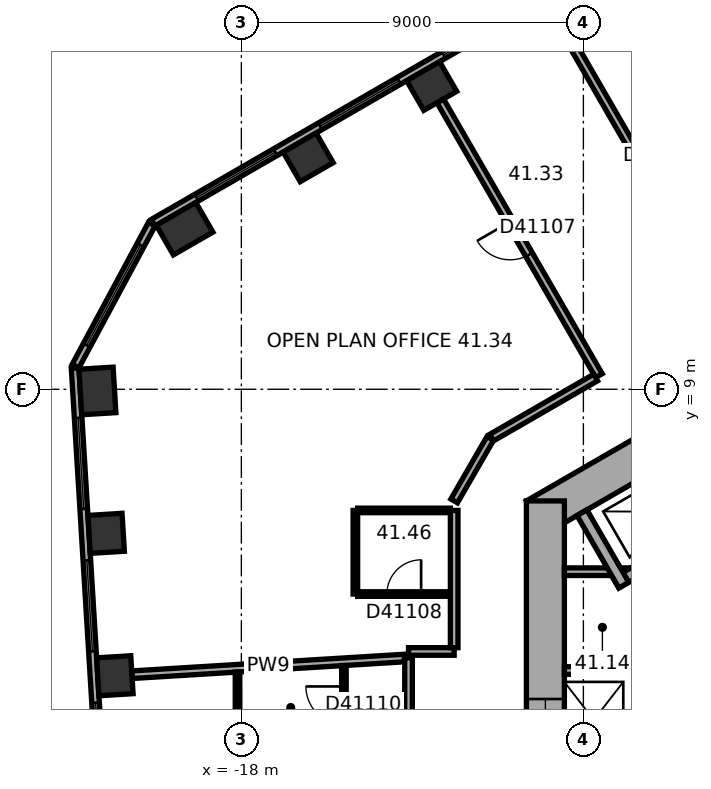
"""IFC4 building model, lengths in metres.
Left out: names, types, materials, properties, quantities, classifications, styles, units other than length and angle.
Written with IfcOpenShell. Run it as: python <this file> out.ifc"""

import sys

from ifc_helpers import new_model, si_unit, direction, frame, frame_2d, origin, origin_2d, place, context, subcontext, project, spatial, rectangle, extrude, element, fill, save


model = new_model("IFC4")
c1 = context("Model", 3, precision=1e-05, world=origin(), true_north=direction((0.0, 1.0)))
c2 = subcontext(c1, "Body", "Model", "MODEL_VIEW")
j1 = project(units=[si_unit("LENGTHUNIT", "METRE"), si_unit("PLANEANGLEUNIT", "RADIAN")], contexts=[c1])
p1 = place(None, origin())
s1 = spatial("IfcSite", under=j1, at=p1, CompositionType="ELEMENT")
p2 = place(p1, origin())
s2 = spatial("IfcBuilding", under=s1, at=p2, CompositionType="ELEMENT")
p3 = place(p2, frame((0.0, 0.0, 168.8)))
s3 = spatial("IfcBuildingStorey", under=s2, at=p3, CompositionType="ELEMENT", Elevation=168.8)
for number, where, z_axis, x_axis in (
    (1, (-12.991, 16.979, 0.0), (0.0, 0.0, 1.0), (-0.866, -0.5, 0.0)),
    (2, (-16.242, 15.102, 0.0), (0.0, 0.0, 1.0), (-0.866, -0.5, 0.0)),
):
    element("IfcColumn", number, at=place(p3, frame(where, z_axis=z_axis, x_axis=x_axis)), inside=s3, PredefinedType="COLUMN", context=c2, shape_type="SweptSolid", body=[
        extrude(rectangle(XDim=1.0, YDim=0.9, at=origin_2d()), origin(), (0.0, 0.0, 1.0), 3.7),
    ])
for number, where, z_axis, x_axis in (
    (3, (-19.494, 13.225, 0.0), (0.0, 0.0, 1.0), (-0.866, -0.5, 0.0)),
    (4, (-21.787, 8.956, 0.0), (0.0, 0.0, 1.0), (0.061, -0.998, 0.0)),
):
    element("IfcColumn", number, at=place(p3, frame(where, z_axis=z_axis, x_axis=x_axis)), inside=s3, PredefinedType="COLUMN", context=c2, shape_type="SweptSolid", body=[
        extrude(rectangle(XDim=1.2, YDim=0.9, at=origin_2d()), origin(), (0.0, 0.0, 1.0), 3.7),
    ])
for number, where, z_axis, x_axis in (
    (5, (-21.558, 5.209, 0.0), (0.0, 0.0, 1.0), (0.061, -0.998, 0.0)),
    (6, (-21.329, 1.462, 0.0), (0.0, 0.0, 1.0), (0.061, -0.998, 0.0)),
):
    element("IfcColumn", number, at=place(p3, frame(where, z_axis=z_axis, x_axis=x_axis)), inside=s3, PredefinedType="COLUMN", context=c2, shape_type="SweptSolid", body=[
        extrude(rectangle(XDim=1.0, YDim=0.9, at=origin_2d()), origin(), (0.0, 0.0, 1.0), 3.7),
    ])
p4 = place(p3, frame((0.25, 11.691, 0.0), z_axis=(0.0, 0.0, 1.0), x_axis=(-0.866022616891, -0.50000482701, 0.0)))
e7 = element("IfcWall", 7, at=p4, inside=s3, PredefinedType="SHEAR", context=c2, shape_type="SweptSolid", body=[
    extrude(rectangle(XDim=12.125, YDim=1.0, at=frame_2d((6.062, 0.0))), origin(), (0.0, 0.0, 1.0), 3.7),
])
p5 = place(p4, frame((6.262, 0.0, 0.0)))
e8 = element("IfcOpeningElement", 8, at=p5, cuts=e7, PredefinedType="OPENING", context=c2, shape_type="SweptSolid", body=[
    extrude(rectangle(XDim=1.5, YDim=2.1, at=frame_2d((0.75, 1.05))), frame((0.0, 0.51, 0.0), z_axis=(0.0, -1.0, 0.0), x_axis=(1.0, 0.0, 0.0)), (0.0, 0.0, 1.0), 1.02),
])
p6 = place(p4, frame((3.112, 0.0, 0.0)))
e9 = element("IfcOpeningElement", 9, at=p6, cuts=e7, PredefinedType="OPENING", context=c2, shape_type="SweptSolid", body=[
    extrude(rectangle(XDim=0.9, YDim=2.1, at=frame_2d((0.45, 1.05))), frame((0.0, 0.51, 0.0), z_axis=(0.0, -1.0, 0.0), x_axis=(1.0, 0.0, 0.0)), (0.0, 0.0, 1.0), 1.02),
])
p7 = place(p3, frame((-10.0, 6.062, 0.0), z_axis=(0.0, 0.0, 1.0), x_axis=(0.0, -1.0, 0.0)))
e10 = element("IfcWall", 10, at=p7, inside=s3, PredefinedType="SHEAR", context=c2, shape_type="SweptSolid", body=[
    extrude(rectangle(XDim=12.125, YDim=1.0, at=frame_2d((6.062, 0.0))), origin(), (0.0, 0.0, 1.0), 3.7),
])
p8 = place(p7, frame((5.212, 0.0, 0.0)))
e11 = element("IfcOpeningElement", 11, at=p8, cuts=e10, PredefinedType="OPENING", context=c2, shape_type="SweptSolid", body=[
    extrude(rectangle(XDim=1.1, YDim=2.1, at=frame_2d((0.55, 1.05))), frame((0.0, 0.51, 0.0), z_axis=(0.0, -1.0, 0.0), x_axis=(1.0, 0.0, 0.0)), (0.0, 0.0, 1.0), 1.02),
])
p9 = place(p7, frame((7.812, 0.0, 0.0)))
e12 = element("IfcOpeningElement", 12, at=p9, cuts=e10, PredefinedType="OPENING", context=c2, shape_type="SweptSolid", body=[
    extrude(rectangle(XDim=1.1, YDim=2.1, at=frame_2d((0.55, 1.05))), frame((0.0, 0.51, 0.0), z_axis=(0.0, -1.0, 0.0), x_axis=(1.0, 0.0, 0.0)), (0.0, 0.0, 1.0), 1.02),
])
p10 = place(p3, frame((-2.961, 23.405, 0.0), z_axis=(0.0, 0.0, 1.0), x_axis=(-0.866023315909, -0.500003616288, 0.0)))
e13 = element("IfcWall", 13, at=p10, inside=s3, PredefinedType="STANDARD", context=c2, shape_type="SweptSolid", body=[
    extrude(rectangle(XDim=20.044, YDim=0.2, at=frame_2d((10.022, 0.0))), origin(), (0.0, 0.0, 1.0), 3.7),
])
p11 = place(p10, frame((1.314, 0.0, 0.9)))
e14 = element("IfcOpeningElement", 14, at=p11, cuts=e13, PredefinedType="OPENING", context=c2, shape_type="SweptSolid", body=[
    extrude(rectangle(XDim=2.4, YDim=2.0, at=frame_2d((1.2, 1.0))), frame((0.0, 0.11, 0.0), z_axis=(0.0, -1.0, 0.0), x_axis=(1.0, 0.0, 0.0)), (0.0, 0.0, 1.0), 0.22),
])
p12 = place(p10, frame((5.069, 0.0, 0.9)))
e15 = element("IfcOpeningElement", 15, at=p12, cuts=e13, PredefinedType="OPENING", context=c2, shape_type="SweptSolid", body=[
    extrude(rectangle(XDim=2.4, YDim=2.0, at=frame_2d((1.2, 1.0))), frame((0.0, 0.11, 0.0), z_axis=(0.0, -1.0, 0.0), x_axis=(1.0, 0.0, 0.0)), (0.0, 0.0, 1.0), 0.22),
])
p13 = place(p10, frame((8.823, 0.0, 0.9)))
e16 = element("IfcOpeningElement", 16, at=p13, cuts=e13, PredefinedType="OPENING", context=c2, shape_type="SweptSolid", body=[
    extrude(rectangle(XDim=2.4, YDim=2.0, at=frame_2d((1.2, 1.0))), frame((0.0, 0.11, 0.0), z_axis=(0.0, -1.0, 0.0), x_axis=(1.0, 0.0, 0.0)), (0.0, 0.0, 1.0), 0.22),
])
p14 = place(p10, frame((12.577, 0.0, 0.9)))
e17 = element("IfcOpeningElement", 17, at=p14, cuts=e13, PredefinedType="OPENING", context=c2, shape_type="SweptSolid", body=[
    extrude(rectangle(XDim=2.4, YDim=2.0, at=frame_2d((1.2, 1.0))), frame((0.0, 0.11, 0.0), z_axis=(0.0, -1.0, 0.0), x_axis=(1.0, 0.0, 0.0)), (0.0, 0.0, 1.0), 0.22),
])
p15 = place(p10, frame((16.331, 0.0, 0.9)))
e18 = element("IfcOpeningElement", 18, at=p15, cuts=e13, PredefinedType="OPENING", context=c2, shape_type="SweptSolid", body=[
    extrude(rectangle(XDim=2.4, YDim=2.0, at=frame_2d((1.2, 1.0))), frame((0.0, 0.11, 0.0), z_axis=(0.0, -1.0, 0.0), x_axis=(1.0, 0.0, 0.0)), (0.0, 0.0, 1.0), 0.22),
])
p16 = place(p3, frame((-20.357, 13.344, 0.0), z_axis=(0.0, 0.0, 1.0), x_axis=(-0.473288913494, -0.880907262068, 0.0)))
e19 = element("IfcWall", 19, at=p16, inside=s3, PredefinedType="STANDARD", context=c2, shape_type="SweptSolid", body=[
    extrude(rectangle(XDim=4.238, YDim=0.2, at=frame_2d((2.119, 0.0))), origin(), (0.0, 0.0, 1.0), 3.7),
])
p17 = place(p16, frame((0.619, 0.0, 0.9)))
e20 = element("IfcOpeningElement", 20, at=p17, cuts=e19, PredefinedType="OPENING", context=c2, shape_type="SweptSolid", body=[
    extrude(rectangle(XDim=3.0, YDim=2.0, at=frame_2d((1.5, 1.0))), frame((0.0, 0.11, 0.0), z_axis=(0.0, -1.0, 0.0), x_axis=(1.0, 0.0, 0.0)), (0.0, 0.0, 1.0), 0.22),
])
p18 = place(p3, frame((-22.375, 9.557, 0.0), z_axis=(0.0, 0.0, 1.0), x_axis=(0.061036015339, -0.998135564356, 0.0)))
e21 = element("IfcWall", 21, at=p18, inside=s3, PredefinedType="STANDARD", context=c2, shape_type="SweptSolid", body=[
    extrude(rectangle(XDim=20.044, YDim=0.2, at=frame_2d((10.022, 0.0))), origin(), (0.0, 0.0, 1.0), 3.7),
])
p19 = place(p18, frame((1.313, 0.0, 0.9)))
e22 = element("IfcOpeningElement", 22, at=p19, cuts=e21, PredefinedType="OPENING", context=c2, shape_type="SweptSolid", body=[
    extrude(rectangle(XDim=2.4, YDim=2.0, at=frame_2d((1.2, 1.0))), frame((0.0, 0.11, 0.0), z_axis=(0.0, -1.0, 0.0), x_axis=(1.0, 0.0, 0.0)), (0.0, 0.0, 1.0), 0.22),
])
p20 = place(p18, frame((5.067, 0.0, 0.9)))
e23 = element("IfcOpeningElement", 23, at=p20, cuts=e21, PredefinedType="OPENING", context=c2, shape_type="SweptSolid", body=[
    extrude(rectangle(XDim=2.4, YDim=2.0, at=frame_2d((1.2, 1.0))), frame((0.0, 0.11, 0.0), z_axis=(0.0, -1.0, 0.0), x_axis=(1.0, 0.0, 0.0)), (0.0, 0.0, 1.0), 0.22),
])
p21 = place(p18, frame((8.821, 0.0, 0.9)))
e24 = element("IfcOpeningElement", 24, at=p21, cuts=e21, PredefinedType="OPENING", context=c2, shape_type="SweptSolid", body=[
    extrude(rectangle(XDim=2.4, YDim=2.0, at=frame_2d((1.2, 1.0))), frame((0.0, 0.11, 0.0), z_axis=(0.0, -1.0, 0.0), x_axis=(1.0, 0.0, 0.0)), (0.0, 0.0, 1.0), 0.22),
])
p22 = place(p18, frame((12.575, 0.0, 0.9)))
e25 = element("IfcOpeningElement", 25, at=p22, cuts=e21, PredefinedType="OPENING", context=c2, shape_type="SweptSolid", body=[
    extrude(rectangle(XDim=2.4, YDim=2.0, at=frame_2d((1.2, 1.0))), frame((0.0, 0.11, 0.0), z_axis=(0.0, -1.0, 0.0), x_axis=(1.0, 0.0, 0.0)), (0.0, 0.0, 1.0), 0.22),
])
p23 = place(p18, frame((16.329, 0.0, 0.9)))
e26 = element("IfcOpeningElement", 26, at=p23, cuts=e21, PredefinedType="OPENING", context=c2, shape_type="SweptSolid", body=[
    extrude(rectangle(XDim=2.4, YDim=2.0, at=frame_2d((1.2, 1.0))), frame((0.0, 0.11, 0.0), z_axis=(0.0, -1.0, 0.0), x_axis=(1.0, 0.0, 0.0)), (0.0, 0.0, 1.0), 0.22),
])
for number, where, z_axis, x_axis in (
    (27, (-7.3, 4.2, 0.0), (0.0, 0.0, 1.0), (-1.0, 0.0, 0.0)),
    (28, (-7.3, 1.6, 0.0), (0.0, 0.0, 1.0), (-1.0, 0.0, 0.0)),
):
    element("IfcWall", number, at=place(p3, frame(where, z_axis=z_axis, x_axis=x_axis)), inside=s3, PredefinedType="PARTITIONING", context=c2, shape_type="SweptSolid", body=[
        extrude(rectangle(XDim=2.2, YDim=0.2, at=frame_2d((1.1, 0.0))), origin(), (0.0, 0.0, 1.0), 3.42),
    ])
p24 = place(p3, frame((-5.24, 5.577, 0.0), z_axis=(0.0, 0.0, 1.0), x_axis=(-0.866014461049, -0.500018952895, 0.0)))
e29 = element("IfcWall", 29, at=p24, inside=s3, PredefinedType="SHEAR", context=c2, shape_type="SweptSolid", body=[
    extrude(rectangle(XDim=3.35, YDim=0.3, at=frame_2d((1.675, 0.0))), origin(), (0.0, 0.0, 1.0), 3.42),
])
p25 = place(p3, frame((-7.937, 3.847, 0.0), z_axis=(0.0, 0.0, 1.0), x_axis=(-0.50002983664, 0.866008176907, 0.0)))
e30 = element("IfcWall", 30, at=p25, inside=s3, PredefinedType="SHEAR", context=c2, shape_type="SweptSolid", body=[
    extrude(rectangle(XDim=2.2, YDim=0.3, at=frame_2d((1.1, 0.0))), origin(), (0.0, 0.0, 1.0), 3.42),
])
p26 = place(p3, frame((-20.88, 1.49, 0.0), z_axis=(0.0, 0.0, 1.0), x_axis=(0.998134881975, 0.061047173439, 0.0)))
e31 = element("IfcWall", 31, at=p26, inside=s3, PredefinedType="PARTITIONING", context=c2, shape_type="SweptSolid", body=[
    extrude(rectangle(XDim=7.183, YDim=0.2, at=frame_2d((3.591, 0.0))), origin(), (0.0, 0.0, 1.0), 2.87),
])
p27 = place(p3, frame((-18.101, 1.559, 0.0), z_axis=(0.0, 0.0, 1.0), x_axis=(0.0, -1.0, 0.0)))
e32 = element("IfcWall", 32, at=p27, inside=s3, PredefinedType="PARTITIONING", context=c2, shape_type="SweptSolid", body=[
    extrude(rectangle(XDim=1.869, YDim=0.12, at=frame_2d((0.934, 0.0))), origin(), (0.0, 0.0, 1.0), 3.42),
])
p28 = place(p3, frame((-15.301, 1.731, 0.0), z_axis=(0.0, 0.0, 1.0), x_axis=(0.0, -1.0, 0.0)))
e33 = element("IfcWall", 33, at=p28, inside=s3, PredefinedType="PARTITIONING", context=c2, shape_type="SweptSolid", body=[
    extrude(rectangle(XDim=7.322, YDim=0.12, at=frame_2d((3.661, 0.0))), origin(), (0.0, 0.0, 1.0), 3.42),
])
p29 = place(p28, frame((0.55, 0.0, 0.0)))
e34 = element("IfcOpeningElement", 34, at=p29, cuts=e33, PredefinedType="OPENING", context=c2, shape_type="SweptSolid", body=[
    extrude(rectangle(XDim=1.0, YDim=2.1, at=frame_2d((0.5, 1.05))), frame((0.0, 0.07, 0.0), z_axis=(0.0, -1.0, 0.0), x_axis=(1.0, 0.0, 0.0)), (0.0, 0.0, 1.0), 0.14),
])
p30 = place(p28, frame((2.736, 0.0, 0.0)))
e35 = element("IfcOpeningElement", 35, at=p30, cuts=e33, PredefinedType="OPENING", context=c2, shape_type="SweptSolid", body=[
    extrude(rectangle(XDim=0.9, YDim=2.1, at=frame_2d((0.45, 1.05))), frame((0.0, 0.07, 0.0), z_axis=(0.0, -1.0, 0.0), x_axis=(1.0, 0.0, 0.0)), (0.0, 0.0, 1.0), 0.14),
])
p31 = place(p28, frame((5.347, 0.0, 0.0)))
e36 = element("IfcOpeningElement", 36, at=p31, cuts=e33, PredefinedType="OPENING", context=c2, shape_type="SweptSolid", body=[
    extrude(rectangle(XDim=0.9, YDim=2.1, at=frame_2d((0.45, 1.05))), frame((0.0, 0.07, 0.0), z_axis=(0.0, -1.0, 0.0), x_axis=(1.0, 0.0, 0.0)), (0.0, 0.0, 1.0), 0.14),
])
p32 = place(p3, frame((-15.0, 3.612, 0.0), z_axis=(0.0, 0.0, 1.0), x_axis=(0.0, 1.0, 0.0)))
e37 = element("IfcWall", 37, at=p32, inside=s3, PredefinedType="PARTITIONING", context=c2, shape_type="SweptSolid", body=[
    extrude(rectangle(XDim=2.2, YDim=0.12, at=frame_2d((1.1, 0.0))), origin(), (0.0, 0.0, 1.0), 3.42),
])
p33 = place(p3, frame((-14.94, 5.812, 0.0), z_axis=(0.0, 0.0, 1.0), x_axis=(1.0, 0.0, 0.0)))
e38 = element("IfcWall", 38, at=p33, inside=s3, PredefinedType="PARTITIONING", context=c2, shape_type="SweptSolid", body=[
    extrude(rectangle(XDim=2.44, YDim=0.12, at=frame_2d((1.22, 0.0))), origin(), (0.0, 0.0, 1.0), 3.42),
])
p34 = place(p3, frame((-13.601, 1.935, 0.0), z_axis=(0.0, 0.0, 1.0), x_axis=(0.0, -1.0, 0.0)))
e39 = element("IfcWall", 39, at=p34, inside=s3, PredefinedType="PARTITIONING", context=c2, shape_type="SweptSolid", body=[
    extrude(rectangle(XDim=5.936, YDim=0.2, at=frame_2d((2.968, 0.0))), origin(), (0.0, 0.0, 1.0), 3.42),
])
p35 = place(p34, frame((2.468, 0.0, 0.0)))
e40 = element("IfcOpeningElement", 40, at=p35, cuts=e39, PredefinedType="OPENING", context=c2, shape_type="SweptSolid", body=[
    extrude(rectangle(XDim=1.0, YDim=2.1, at=frame_2d((0.5, 1.05))), frame((0.0, 0.11, 0.0), z_axis=(0.0, -1.0, 0.0), x_axis=(1.0, 0.0, 0.0)), (0.0, 0.0, 1.0), 0.22),
])
p36 = place(p3, frame((-12.766, 16.589, 0.0), z_axis=(0.0, 0.0, 1.0), x_axis=(0.500010139422, -0.866019549707, 0.0)))
e41 = element("IfcWall", 41, at=p36, inside=s3, PredefinedType="PARTITIONING", context=c2, shape_type="SweptSolid", body=[
    extrude(rectangle(XDim=8.35, YDim=0.2, at=frame_2d((4.175, 0.0))), origin(), (0.0, 0.0, 1.0), 3.42),
])
p37 = place(p36, frame((3.675, 0.0, 0.0)))
e42 = element("IfcOpeningElement", 42, at=p37, cuts=e41, PredefinedType="OPENING", context=c2, shape_type="SweptSolid", body=[
    extrude(rectangle(XDim=1.0, YDim=2.1, at=frame_2d((0.5, 1.05))), frame((0.0, 0.11, 0.0), z_axis=(0.0, -1.0, 0.0), x_axis=(1.0, 0.0, 0.0)), (0.0, 0.0, 1.0), 0.22),
])
p38 = place(p3, frame((-12.5, 3.612, 0.0), z_axis=(0.0, 0.0, 1.0), x_axis=(-1.0, 0.0, 0.0)))
e43 = element("IfcWall", 43, at=p38, inside=s3, PredefinedType="PARTITIONING", context=c2, shape_type="SweptSolid", body=[
    extrude(rectangle(XDim=2.44, YDim=0.12, at=frame_2d((1.22, 0.0))), origin(), (0.0, 0.0, 1.0), 3.42),
])
p39 = place(p38, frame((0.77, 0.0, 0.0)))
e44 = element("IfcOpeningElement", 44, at=p39, cuts=e43, PredefinedType="OPENING", context=c2, shape_type="SweptSolid", body=[
    extrude(rectangle(XDim=0.9, YDim=2.1, at=frame_2d((0.45, 1.05))), frame((0.0, 0.07, 0.0), z_axis=(0.0, -1.0, 0.0), x_axis=(1.0, 0.0, 0.0)), (0.0, 0.0, 1.0), 0.14),
])
p40 = place(p3, frame((-12.4, 2.101, 0.0), z_axis=(0.0, 0.0, 1.0), x_axis=(-1.0, 0.0, 0.0)))
e45 = element("IfcWall", 45, at=p40, inside=s3, PredefinedType="PARTITIONING", context=c2, shape_type="SweptSolid", body=[
    extrude(rectangle(XDim=1.201, YDim=0.2, at=frame_2d((0.601, 0.0))), origin(), (0.0, 0.0, 1.0), 3.42),
])
p41 = place(p3, frame((-12.4, 5.812, 0.0), z_axis=(0.0, 0.0, 1.0), x_axis=(0.0, -1.0, 0.0)))
e46 = element("IfcWall", 46, at=p41, inside=s3, PredefinedType="PARTITIONING", context=c2, shape_type="SweptSolid", body=[
    extrude(rectangle(XDim=3.611, YDim=0.2, at=frame_2d((1.806, 0.0))), origin(), (0.0, 0.0, 1.0), 3.42),
])
p42 = place(p3, frame((-11.45, 7.708, 0.0), z_axis=(0.0, 0.0, 1.0), x_axis=(-0.500022797313, -0.86601224135, 0.0)))
e47 = element("IfcWall", 47, at=p42, inside=s3, PredefinedType="PARTITIONING", context=c2, shape_type="SweptSolid", body=[
    extrude(rectangle(XDim=1.9, YDim=0.2, at=frame_2d((0.95, 0.0))), origin(), (0.0, 0.0, 1.0), 3.42),
])
p43 = place(p3, frame((-9.515, 18.466, 0.0), z_axis=(0.0, 0.0, 1.0), x_axis=(0.500010139422, -0.866019549707, 0.0)))
e48 = element("IfcWall", 48, at=p43, inside=s3, PredefinedType="PARTITIONING", context=c2, shape_type="SweptSolid", body=[
    extrude(rectangle(XDim=8.35, YDim=0.2, at=frame_2d((4.175, 0.0))), origin(), (0.0, 0.0, 1.0), 2.87),
])
p44 = place(p43, frame((3.675, 0.0, 0.0)))
e49 = element("IfcOpeningElement", 49, at=p44, cuts=e48, PredefinedType="OPENING", context=c2, shape_type="SweptSolid", body=[
    extrude(rectangle(XDim=1.0, YDim=2.1, at=frame_2d((0.5, 1.05))), frame((0.0, 0.11, 0.0), z_axis=(0.0, -1.0, 0.0), x_axis=(1.0, 0.0, 0.0)), (0.0, 0.0, 1.0), 0.22),
])
p45 = place(p3, frame((-8.678, 9.308, 0.0), z_axis=(0.0, 0.0, 1.0), x_axis=(-0.866000359435, -0.500043375578, 0.0)))
e50 = element("IfcWall", 50, at=p45, inside=s3, PredefinedType="PARTITIONING", context=c2, shape_type="SweptSolid", body=[
    extrude(rectangle(XDim=3.161, YDim=0.2, at=frame_2d((1.581, 0.0))), origin(), (0.0, 0.0, 1.0), 3.42),
])
p46 = place(p13, origin())
e51 = element("IfcWindow", 51, at=p46, inside=s3, PartitioningType="SINGLE_PANEL", PredefinedType="WINDOW", context=c2, shape_type="SweptSolid", body=[
    extrude(rectangle(XDim=2.4, YDim=2.0, at=frame_2d((1.2, 1.0))), frame((0.0, 0.03, 0.0), z_axis=(0.0, -1.0, 0.0), x_axis=(1.0, 0.0, 0.0)), (0.0, 0.0, 1.0), 0.06),
])
fill(e16, e51)
p47 = place(p14, origin())
e52 = element("IfcWindow", 52, at=p47, inside=s3, PartitioningType="SINGLE_PANEL", PredefinedType="WINDOW", context=c2, shape_type="SweptSolid", body=[
    extrude(rectangle(XDim=2.4, YDim=2.0, at=frame_2d((1.2, 1.0))), frame((0.0, 0.03, 0.0), z_axis=(0.0, -1.0, 0.0), x_axis=(1.0, 0.0, 0.0)), (0.0, 0.0, 1.0), 0.06),
])
fill(e17, e52)
p48 = place(p15, origin())
e53 = element("IfcWindow", 53, at=p48, inside=s3, PartitioningType="SINGLE_PANEL", PredefinedType="WINDOW", context=c2, shape_type="SweptSolid", body=[
    extrude(rectangle(XDim=2.4, YDim=2.0, at=frame_2d((1.2, 1.0))), frame((0.0, 0.03, 0.0), z_axis=(0.0, -1.0, 0.0), x_axis=(1.0, 0.0, 0.0)), (0.0, 0.0, 1.0), 0.06),
])
fill(e18, e53)
p49 = place(p17, origin())
e54 = element("IfcWindow", 54, at=p49, inside=s3, PartitioningType="SINGLE_PANEL", PredefinedType="WINDOW", context=c2, shape_type="SweptSolid", body=[
    extrude(rectangle(XDim=3.0, YDim=2.0, at=frame_2d((1.5, 1.0))), frame((0.0, 0.03, 0.0), z_axis=(0.0, -1.0, 0.0), x_axis=(1.0, 0.0, 0.0)), (0.0, 0.0, 1.0), 0.06),
])
fill(e20, e54)
p50 = place(p19, origin())
e55 = element("IfcWindow", 55, at=p50, inside=s3, PartitioningType="SINGLE_PANEL", PredefinedType="WINDOW", context=c2, shape_type="SweptSolid", body=[
    extrude(rectangle(XDim=2.4, YDim=2.0, at=frame_2d((1.2, 1.0))), frame((0.0, 0.03, 0.0), z_axis=(0.0, -1.0, 0.0), x_axis=(1.0, 0.0, 0.0)), (0.0, 0.0, 1.0), 0.06),
])
fill(e22, e55)
p51 = place(p20, origin())
e56 = element("IfcWindow", 56, at=p51, inside=s3, PartitioningType="SINGLE_PANEL", PredefinedType="WINDOW", context=c2, shape_type="SweptSolid", body=[
    extrude(rectangle(XDim=2.4, YDim=2.0, at=frame_2d((1.2, 1.0))), frame((0.0, 0.03, 0.0), z_axis=(0.0, -1.0, 0.0), x_axis=(1.0, 0.0, 0.0)), (0.0, 0.0, 1.0), 0.06),
])
fill(e23, e56)
p52 = place(p21, origin())
e57 = element("IfcWindow", 57, at=p52, inside=s3, PartitioningType="SINGLE_PANEL", PredefinedType="WINDOW", context=c2, shape_type="SweptSolid", body=[
    extrude(rectangle(XDim=2.4, YDim=2.0, at=frame_2d((1.2, 1.0))), frame((0.0, 0.03, 0.0), z_axis=(0.0, -1.0, 0.0), x_axis=(1.0, 0.0, 0.0)), (0.0, 0.0, 1.0), 0.06),
])
fill(e24, e57)
p53 = place(p8, origin())
e58 = element("IfcDoor", 58, at=p53, inside=s3, OperationType="DOUBLE_DOOR_SLIDING", PredefinedType="DOOR", context=c2, shape_type="SweptSolid", body=[
    extrude(rectangle(XDim=1.1, YDim=2.1, at=frame_2d((0.55, 1.05))), frame((0.0, 0.025, 0.0), z_axis=(0.0, -1.0, 0.0), x_axis=(1.0, 0.0, 0.0)), (0.0, 0.0, 1.0), 0.05),
])
fill(e11, e58)
p54 = place(p37, origin())
e59 = element("IfcDoor", 59, at=p54, inside=s3, OperationType="SINGLE_SWING_LEFT", PredefinedType="DOOR", context=c2, shape_type="SweptSolid", body=[
    extrude(rectangle(XDim=1.0, YDim=2.1, at=frame_2d((0.5, 1.05))), frame((0.0, 0.025, 0.0), z_axis=(0.0, -1.0, 0.0), x_axis=(1.0, 0.0, 0.0)), (0.0, 0.0, 1.0), 0.05),
])
fill(e42, e59)
p55 = place(p39, origin())
e60 = element("IfcDoor", 60, at=p55, inside=s3, OperationType="SINGLE_SWING_LEFT", PredefinedType="DOOR", context=c2, shape_type="SweptSolid", body=[
    extrude(rectangle(XDim=0.9, YDim=2.1, at=frame_2d((0.45, 1.05))), frame((0.0, 0.025, 0.0), z_axis=(0.0, -1.0, 0.0), x_axis=(1.0, 0.0, 0.0)), (0.0, 0.0, 1.0), 0.05),
])
fill(e44, e60)
p56 = place(p29, origin())
e61 = element("IfcDoor", 61, at=p56, inside=s3, OperationType="SINGLE_SWING_LEFT", PredefinedType="DOOR", context=c2, shape_type="SweptSolid", body=[
    extrude(rectangle(XDim=1.0, YDim=2.1, at=frame_2d((0.5, 1.05))), frame((0.0, 0.025, 0.0), z_axis=(0.0, -1.0, 0.0), x_axis=(1.0, 0.0, 0.0)), (0.0, 0.0, 1.0), 0.05),
])
fill(e34, e61)
save(model, sys.argv[1])
